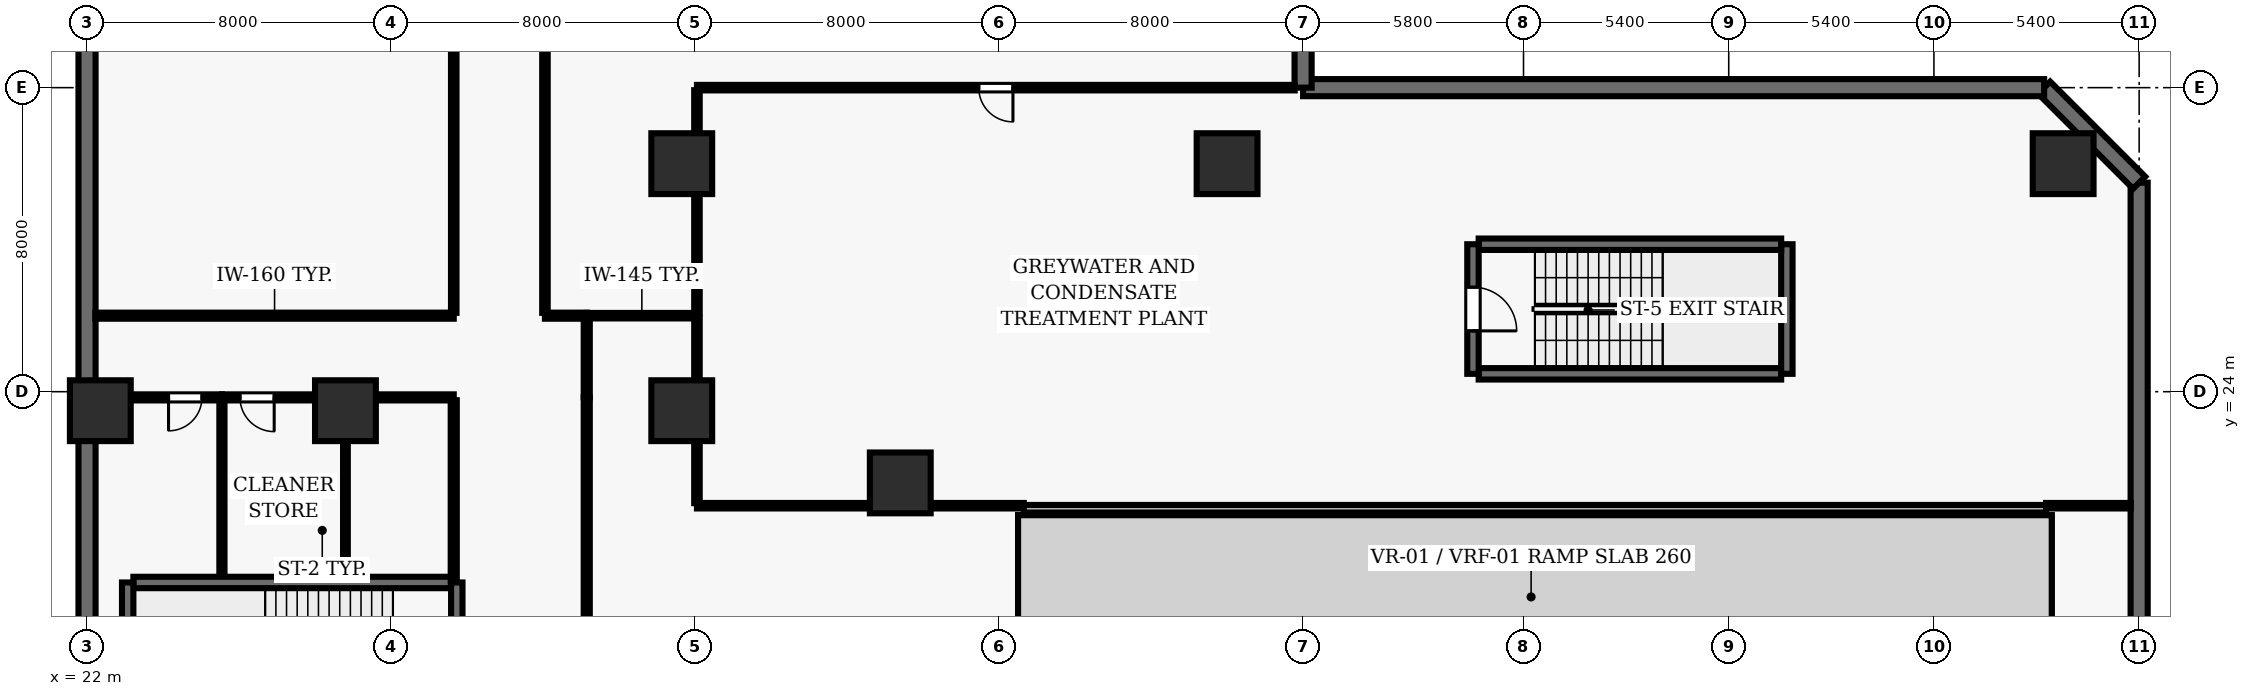
"""IFC4 building model, lengths in metres.
Left out: names, types, materials, properties, quantities, classifications, styles, units other than length and angle.
Written with IfcOpenShell. Run it as: python <this file> out.ifc"""

import sys

from ifc_helpers import new_model, si_unit, direction, frame, frame_2d, origin, origin_2d, place, context, subcontext, project, spatial, rectangle, extrude, element, fill, save


model = new_model("IFC4")
c1 = context("Model", 3, precision=1e-05, world=origin(), true_north=direction((0.0, 1.0)))
c2 = subcontext(c1, "Body", "Model", "MODEL_VIEW")
j1 = project(units=[si_unit("LENGTHUNIT", "METRE"), si_unit("PLANEANGLEUNIT", "RADIAN")], contexts=[c1])
p1 = place(None, origin())
s1 = spatial("IfcSite", under=j1, at=p1, CompositionType="ELEMENT")
p2 = place(p1, origin())
s2 = spatial("IfcBuilding", under=s1, at=p2, CompositionType="ELEMENT")
p3 = place(p2, frame((0.0, 0.0, -9.0)))
s3 = spatial("IfcBuildingStorey", under=s2, at=p3, CompositionType="ELEMENT", Elevation=-9.0)
for number, where, z_axis, x_axis in (
    (1, (22.35, 23.5, 0.0), (0.0, 0.0, 1.0), (1.0, 0.0, 0.0)),
    (2, (28.8, 23.5, 0.0), (0.0, 0.0, 1.0), (1.0, 0.0, 0.0)),
    (3, (37.65, 23.5, 0.0), (0.0, 0.0, 1.0), (1.0, 0.0, 0.0)),
    (4, (37.65, 30.0, 0.0), (0.0, 0.0, 1.0), (1.0, 0.0, 0.0)),
    (5, (43.4, 21.6, 0.0), (0.0, 0.0, 1.0), (1.0, 0.0, 0.0)),
    (6, (52.0, 30.0, 0.0), (0.0, 0.0, 1.0), (1.0, 0.0, 0.0)),
    (7, (74.0, 30.0, 0.0), (0.0, 0.0, 1.0), (1.0, 0.0, 0.0)),
):
    element("IfcColumn", number, at=place(p3, frame(where, z_axis=z_axis, x_axis=x_axis)), inside=s3, PredefinedType="COLUMN", context=c2, shape_type="SweptSolid", body=[
        extrude(rectangle(XDim=1.6, YDim=1.6, at=origin_2d()), origin(), (0.0, 0.0, 1.0), 4.5),
    ])
p4 = place(p3, frame((76.0, 2.5, 0.0), z_axis=(0.0, 0.0, 1.0), x_axis=(0.0, 1.0, 0.0)))
e8 = element("IfcWall", 8, at=p4, inside=s3, PredefinedType="USERDEFINED", context=c2, shape_type="SweptSolid", body=[
    extrude(rectangle(XDim=27.0, YDim=0.45, at=frame_2d((13.5, 0.0))), origin(), (0.0, 0.0, 1.0), 4.22),
])
p5 = place(p3, frame((76.0, 29.5, 0.0), z_axis=(0.0, 0.0, 1.0), x_axis=(-0.707106781187, 0.707106781187, 0.0)))
e9 = element("IfcWall", 9, at=p5, inside=s3, PredefinedType="USERDEFINED", context=c2, shape_type="SweptSolid", body=[
    extrude(rectangle(XDim=3.536, YDim=0.45, at=frame_2d((1.768, 0.0))), origin(), (0.0, 0.0, 1.0), 4.22),
])
for number, where, z_axis, x_axis in (
    (10, (73.5, 32.0, 0.0), (0.0, 0.0, 1.0), (-1.0, 0.0, 0.0)),
    (11, (54.0, 32.0, 0.0), (0.0, 0.0, 1.0), (0.0, 1.0, 0.0)),
):
    element("IfcWall", number, at=place(p3, frame(where, z_axis=z_axis, x_axis=x_axis)), inside=s3, PredefinedType="USERDEFINED", context=c2, shape_type="SweptSolid", body=[
        extrude(rectangle(XDim=19.5, YDim=0.45, at=frame_2d((9.75, 0.0))), origin(), (0.0, 0.0, 1.0), 4.22),
    ])
p6 = place(p3, frame((22.0, 51.5, 0.0), z_axis=(0.0, 0.0, 1.0), x_axis=(0.0, -1.0, 0.0)))
e12 = element("IfcWall", 12, at=p6, inside=s3, PredefinedType="USERDEFINED", context=c2, shape_type="SweptSolid", body=[
    extrude(rectangle(XDim=49.0, YDim=0.45, at=frame_2d((24.5, 0.0))), origin(), (0.0, 0.0, 1.0), 4.22),
])
p7 = place(p3, frame((31.58, 18.98, 0.0), z_axis=(0.0, 0.0, 1.0), x_axis=(-1.0, 0.0, 0.0)))
e13 = element("IfcWall", 13, at=p7, inside=s3, PredefinedType="SHEAR", context=c2, shape_type="SweptSolid", body=[
    extrude(rectangle(XDim=8.36, YDim=0.3, at=frame_2d((4.18, 0.0))), origin(), (0.0, 0.0, 1.0), 4.22),
])
p8 = place(p3, frame((23.07, 18.98, 0.0), z_axis=(0.0, 0.0, 1.0), x_axis=(0.0, -1.0, 0.0)))
e14 = element("IfcWall", 14, at=p8, inside=s3, PredefinedType="SHEAR", context=c2, shape_type="SweptSolid", body=[
    extrude(rectangle(XDim=3.51, YDim=0.3, at=frame_2d((1.755, 0.0))), origin(), (0.0, 0.0, 1.0), 4.22),
])
p9 = place(p3, frame((31.73, 15.47, 0.0), z_axis=(0.0, 0.0, 1.0), x_axis=(0.0, 1.0, 0.0)))
e15 = element("IfcWall", 15, at=p9, inside=s3, PredefinedType="SHEAR", context=c2, shape_type="SweptSolid", body=[
    extrude(rectangle(XDim=3.51, YDim=0.3, at=frame_2d((1.755, 0.0))), origin(), (0.0, 0.0, 1.0), 4.22),
])
p10 = place(p9, frame((1.18, 0.0, 0.0)))
e16 = element("IfcOpeningElement", 16, at=p10, cuts=e15, PredefinedType="OPENING", context=c2, shape_type="SweptSolid", body=[
    extrude(rectangle(XDim=1.15, YDim=2.15, at=frame_2d((0.575, 1.075))), frame((0.0, 0.16, 0.0), z_axis=(0.0, -1.0, 0.0), x_axis=(1.0, 0.0, 0.0)), (0.0, 0.0, 1.0), 0.32),
])
p11 = place(p3, frame((58.62, 24.47, 0.0), z_axis=(0.0, 0.0, 1.0), x_axis=(1.0, 0.0, 0.0)))
e17 = element("IfcWall", 17, at=p11, inside=s3, PredefinedType="SHEAR", context=c2, shape_type="SweptSolid", body=[
    extrude(rectangle(XDim=7.96, YDim=0.3, at=frame_2d((3.98, 0.0))), origin(), (0.0, 0.0, 1.0), 4.22),
])
p12 = place(p3, frame((66.73, 24.47, 0.0), z_axis=(0.0, 0.0, 1.0), x_axis=(0.0, 1.0, 0.0)))
e18 = element("IfcWall", 18, at=p12, inside=s3, PredefinedType="SHEAR", context=c2, shape_type="SweptSolid", body=[
    extrude(rectangle(XDim=3.41, YDim=0.3, at=frame_2d((1.705, 0.0))), origin(), (0.0, 0.0, 1.0), 4.22),
])
p13 = place(p3, frame((66.58, 27.88, 0.0), z_axis=(0.0, 0.0, 1.0), x_axis=(-1.0, 0.0, 0.0)))
e19 = element("IfcWall", 19, at=p13, inside=s3, PredefinedType="SHEAR", context=c2, shape_type="SweptSolid", body=[
    extrude(rectangle(XDim=7.96, YDim=0.3, at=frame_2d((3.98, 0.0))), origin(), (0.0, 0.0, 1.0), 4.22),
])
p14 = place(p3, frame((58.47, 27.88, 0.0), z_axis=(0.0, 0.0, 1.0), x_axis=(0.0, -1.0, 0.0)))
e20 = element("IfcWall", 20, at=p14, inside=s3, PredefinedType="SHEAR", context=c2, shape_type="SweptSolid", body=[
    extrude(rectangle(XDim=3.41, YDim=0.3, at=frame_2d((1.705, 0.0))), origin(), (0.0, 0.0, 1.0), 4.22),
])
p15 = place(p14, frame((1.13, 0.0, 0.0)))
e21 = element("IfcOpeningElement", 21, at=p15, cuts=e20, PredefinedType="OPENING", context=c2, shape_type="SweptSolid", body=[
    extrude(rectangle(XDim=1.15, YDim=2.15, at=frame_2d((0.575, 1.075))), frame((0.0, 0.16, 0.0), z_axis=(0.0, -1.0, 0.0), x_axis=(1.0, 0.0, 0.0)), (0.0, 0.0, 1.0), 0.32),
])
p16 = place(p3, frame((46.65, 20.92, 0.0), z_axis=(0.0, 0.0, 1.0), x_axis=(1.0, 0.0, 0.0)))
e22 = element("IfcWall", 22, at=p16, inside=s3, PredefinedType="SOLIDWALL", context=c2, shape_type="SweptSolid", body=[
    extrude(rectangle(XDim=26.9, YDim=0.2, at=frame_2d((13.45, 0.0))), origin(), (0.0, 0.0, 1.0), 4.22),
])
p17 = place(p3, frame((25.55, 23.85, 0.0), z_axis=(0.0, 0.0, 1.0), x_axis=(-1.0, 0.0, 0.0)))
e23 = element("IfcWall", 23, at=p17, inside=s3, PredefinedType="PARTITIONING", context=c2, shape_type="SweptSolid", body=[
    extrude(rectangle(XDim=3.33, YDim=0.16, at=frame_2d((1.665, 0.0))), origin(), (0.0, 0.0, 1.0), 3.365),
])
p18 = place(p17, frame((0.525, 0.0, 0.0)))
e24 = element("IfcOpeningElement", 24, at=p18, cuts=e23, PredefinedType="OPENING", context=c2, shape_type="SweptSolid", body=[
    extrude(rectangle(XDim=0.88, YDim=2.1, at=frame_2d((0.44, 1.05))), frame((0.0, 0.09, 0.0), z_axis=(0.0, -1.0, 0.0), x_axis=(1.0, 0.0, 0.0)), (0.0, 0.0, 1.0), 0.18),
])
p19 = place(p3, frame((28.8, 23.85, 0.0), z_axis=(0.0, 0.0, 1.0), x_axis=(-1.0, 0.0, 0.0)))
e25 = element("IfcWall", 25, at=p19, inside=s3, PredefinedType="PARTITIONING", context=c2, shape_type="SweptSolid", body=[
    extrude(rectangle(XDim=3.25, YDim=0.16, at=frame_2d((1.625, 0.0))), origin(), (0.0, 0.0, 1.0), 3.365),
])
p20 = place(p19, frame((1.875, 0.0, 0.0)))
e26 = element("IfcOpeningElement", 26, at=p20, cuts=e25, PredefinedType="OPENING", context=c2, shape_type="SweptSolid", body=[
    extrude(rectangle(XDim=0.9, YDim=2.1, at=frame_2d((0.45, 1.05))), frame((0.0, 0.09, 0.0), z_axis=(0.0, -1.0, 0.0), x_axis=(1.0, 0.0, 0.0)), (0.0, 0.0, 1.0), 0.18),
])
p21 = place(p3, frame((28.8, 23.85, 0.0), z_axis=(0.0, 0.0, 1.0), x_axis=(1.0, 0.0, 0.0)))
e27 = element("IfcWall", 27, at=p21, inside=s3, PredefinedType="PARTITIONING", context=c2, shape_type="SweptSolid", body=[
    extrude(rectangle(XDim=2.85, YDim=0.16, at=frame_2d((1.425, 0.0))), origin(), (0.0, 0.0, 1.0), 3.365),
])
p22 = place(p3, frame((31.65, 26.0, 0.0), z_axis=(0.0, 0.0, 1.0), x_axis=(-1.0, 0.0, 0.0)))
e28 = element("IfcWall", 28, at=p22, inside=s3, PredefinedType="PARTITIONING", context=c2, shape_type="SweptSolid", body=[
    extrude(rectangle(XDim=9.43, YDim=0.16, at=frame_2d((4.715, 0.0))), origin(), (0.0, 0.0, 1.0), 4.22),
])
p23 = place(p3, frame((35.15, 26.0, 0.0), z_axis=(0.0, 0.0, 1.0), x_axis=(-1.0, 0.0, 0.0)))
e29 = element("IfcWall", 29, at=p23, inside=s3, PredefinedType="PARTITIONING", context=c2, shape_type="SweptSolid", body=[
    extrude(rectangle(XDim=1.1, YDim=0.16, at=frame_2d((0.55, 0.0))), origin(), (0.0, 0.0, 1.0), 4.22),
])
p24 = place(p3, frame((35.15, 26.0, 0.0), z_axis=(0.0, 0.0, 1.0), x_axis=(1.0, 0.0, 0.0)))
e30 = element("IfcWall", 30, at=p24, inside=s3, PredefinedType="PARTITIONING", context=c2, shape_type="SweptSolid", body=[
    extrude(rectangle(XDim=2.9, YDim=0.145, at=frame_2d((1.45, 0.0))), origin(), (0.0, 0.0, 1.0), 4.22),
])
p25 = place(p3, frame((38.05, 21.0, 0.0), z_axis=(0.0, 0.0, 1.0), x_axis=(1.0, 0.0, 0.0)))
e31 = element("IfcWall", 31, at=p25, inside=s3, PredefinedType="PARTITIONING", context=c2, shape_type="SweptSolid", body=[
    extrude(rectangle(XDim=8.6, YDim=0.145, at=frame_2d((4.3, 0.0))), origin(), (0.0, 0.0, 1.0), 4.22),
])
p26 = place(p3, frame((53.78, 32.0, 0.0), z_axis=(0.0, 0.0, 1.0), x_axis=(-1.0, 0.0, 0.0)))
e32 = element("IfcWall", 32, at=p26, inside=s3, PredefinedType="PARTITIONING", context=c2, shape_type="SweptSolid", body=[
    extrude(rectangle(XDim=15.73, YDim=0.145, at=frame_2d((7.865, 0.0))), origin(), (0.0, 0.0, 1.0), 4.22),
])
p27 = place(p26, frame((7.415, 0.0, 0.0)))
e33 = element("IfcOpeningElement", 33, at=p27, cuts=e32, PredefinedType="OPENING", context=c2, shape_type="SweptSolid", body=[
    extrude(rectangle(XDim=0.9, YDim=2.1, at=frame_2d((0.45, 1.05))), frame((0.0, 0.083, 0.0), z_axis=(0.0, -1.0, 0.0), x_axis=(1.0, 0.0, 0.0)), (0.0, 0.0, 1.0), 0.165),
])
p28 = place(p3, frame((73.55, 21.0, 0.0), z_axis=(0.0, 0.0, 1.0), x_axis=(1.0, 0.0, 0.0)))
e34 = element("IfcWall", 34, at=p28, inside=s3, PredefinedType="PARTITIONING", context=c2, shape_type="SweptSolid", body=[
    extrude(rectangle(XDim=2.23, YDim=0.145, at=frame_2d((1.115, 0.0))), origin(), (0.0, 0.0, 1.0), 4.22),
])
p29 = place(p3, frame((25.55, 19.16, 0.0), z_axis=(0.0, 0.0, 1.0), x_axis=(0.0, 1.0, 0.0)))
e35 = element("IfcWall", 35, at=p29, inside=s3, PredefinedType="PARTITIONING", context=c2, shape_type="SweptSolid", body=[
    extrude(rectangle(XDim=4.615, YDim=0.135, at=frame_2d((2.308, 0.0))), origin(), (0.0, 0.0, 1.0), 4.22),
])
p30 = place(p3, frame((28.8, 19.16, 0.0), z_axis=(0.0, 0.0, 1.0), x_axis=(0.0, 1.0, 0.0)))
e36 = element("IfcWall", 36, at=p30, inside=s3, PredefinedType="PARTITIONING", context=c2, shape_type="SweptSolid", body=[
    extrude(rectangle(XDim=4.615, YDim=0.125, at=frame_2d((2.308, 0.0))), origin(), (0.0, 0.0, 1.0), 4.22),
])
p31 = place(p3, frame((31.65, 23.775, 0.0), z_axis=(0.0, 0.0, 1.0), x_axis=(0.0, -1.0, 0.0)))
e37 = element("IfcWall", 37, at=p31, inside=s3, PredefinedType="PARTITIONING", context=c2, shape_type="SweptSolid", body=[
    extrude(rectangle(XDim=4.765, YDim=0.16, at=frame_2d((2.382, 0.0))), origin(), (0.0, 0.0, 1.0), 4.22),
])
p32 = place(p3, frame((31.65, 53.78, 0.0), z_axis=(0.0, 0.0, 1.0), x_axis=(0.0, -1.0, 0.0)))
e38 = element("IfcWall", 38, at=p32, inside=s3, PredefinedType="PARTITIONING", context=c2, shape_type="SweptSolid", body=[
    extrude(rectangle(XDim=27.705, YDim=0.145, at=frame_2d((13.853, 0.0))), origin(), (0.0, 0.0, 1.0), 4.22),
])
p33 = place(p32, frame((13.403, 0.0, 0.0)))
e39 = element("IfcOpeningElement", 39, at=p33, cuts=e38, PredefinedType="OPENING", context=c2, shape_type="SweptSolid", body=[
    extrude(rectangle(XDim=0.9, YDim=2.1, at=frame_2d((0.45, 1.05))), frame((0.0, 0.083, 0.0), z_axis=(0.0, -1.0, 0.0), x_axis=(1.0, 0.0, 0.0)), (0.0, 0.0, 1.0), 0.165),
])
p34 = place(p3, frame((34.05, 26.075, 0.0), z_axis=(0.0, 0.0, 1.0), x_axis=(0.0, 1.0, 0.0)))
e40 = element("IfcWall", 40, at=p34, inside=s3, PredefinedType="PARTITIONING", context=c2, shape_type="SweptSolid", body=[
    extrude(rectangle(XDim=27.705, YDim=0.145, at=frame_2d((13.853, 0.0))), origin(), (0.0, 0.0, 1.0), 4.22),
])
p35 = place(p34, frame((13.403, 0.0, 0.0)))
e41 = element("IfcOpeningElement", 41, at=p35, cuts=e40, PredefinedType="OPENING", context=c2, shape_type="SweptSolid", body=[
    extrude(rectangle(XDim=0.9, YDim=2.1, at=frame_2d((0.45, 1.05))), frame((0.0, 0.083, 0.0), z_axis=(0.0, -1.0, 0.0), x_axis=(1.0, 0.0, 0.0)), (0.0, 0.0, 1.0), 0.165),
])
p36 = place(p3, frame((35.15, 9.625, 0.0), z_axis=(0.0, 0.0, 1.0), x_axis=(0.0, 1.0, 0.0)))
e42 = element("IfcWall", 42, at=p36, inside=s3, PredefinedType="PARTITIONING", context=c2, shape_type="SweptSolid", body=[
    extrude(rectangle(XDim=14.225, YDim=0.16, at=frame_2d((7.113, 0.0))), origin(), (0.0, 0.0, 1.0), 4.22),
])
p37 = place(p3, frame((35.15, 23.85, 0.0), z_axis=(0.0, 0.0, 1.0), x_axis=(0.0, 1.0, 0.0)))
e43 = element("IfcWall", 43, at=p37, inside=s3, PredefinedType="PARTITIONING", context=c2, shape_type="SweptSolid", body=[
    extrude(rectangle(XDim=2.075, YDim=0.16, at=frame_2d((1.038, 0.0))), origin(), (0.0, 0.0, 1.0), 4.22),
])
p38 = place(p3, frame((38.05, 25.933, 0.0), z_axis=(0.0, 0.0, 1.0), x_axis=(0.0, -1.0, 0.0)))
e44 = element("IfcWall", 44, at=p38, inside=s3, PredefinedType="PARTITIONING", context=c2, shape_type="SweptSolid", body=[
    extrude(rectangle(XDim=4.866, YDim=0.145, at=frame_2d((2.433, 0.0))), origin(), (0.0, 0.0, 1.0), 3.365),
])
p39 = place(p3, frame((38.05, 31.933, 0.0), z_axis=(0.0, 0.0, 1.0), x_axis=(0.0, -1.0, 0.0)))
e45 = element("IfcWall", 45, at=p39, inside=s3, PredefinedType="PARTITIONING", context=c2, shape_type="SweptSolid", body=[
    extrude(rectangle(XDim=5.866, YDim=0.145, at=frame_2d((2.933, 0.0))), origin(), (0.0, 0.0, 1.0), 3.365),
])
p40 = place(p15, origin())
e46 = element("IfcDoor", 46, at=p40, inside=s3, OperationType="SINGLE_SWING_RIGHT", PredefinedType="DOOR", context=c2, shape_type="SweptSolid", body=[
    extrude(rectangle(XDim=1.15, YDim=2.15, at=frame_2d((0.575, 1.075))), frame((0.0, 0.025, 0.0), z_axis=(0.0, -1.0, 0.0), x_axis=(1.0, 0.0, 0.0)), (0.0, 0.0, 1.0), 0.05),
])
fill(e21, e46)
p41 = place(p18, origin())
e47 = element("IfcDoor", 47, at=p41, inside=s3, OperationType="SINGLE_SWING_RIGHT", PredefinedType="DOOR", context=c2, shape_type="SweptSolid", body=[
    extrude(rectangle(XDim=0.88, YDim=2.1, at=frame_2d((0.44, 1.05))), frame((0.0, 0.025, 0.0), z_axis=(0.0, -1.0, 0.0), x_axis=(1.0, 0.0, 0.0)), (0.0, 0.0, 1.0), 0.05),
])
fill(e24, e47)
p42 = place(p20, origin())
e48 = element("IfcDoor", 48, at=p42, inside=s3, OperationType="SINGLE_SWING_LEFT", PredefinedType="DOOR", context=c2, shape_type="SweptSolid", body=[
    extrude(rectangle(XDim=0.9, YDim=2.1, at=frame_2d((0.45, 1.05))), frame((0.0, 0.025, 0.0), z_axis=(0.0, -1.0, 0.0), x_axis=(1.0, 0.0, 0.0)), (0.0, 0.0, 1.0), 0.05),
])
fill(e26, e48)
p43 = place(p27, origin())
e49 = element("IfcDoor", 49, at=p43, inside=s3, OperationType="SINGLE_SWING_LEFT", PredefinedType="DOOR", context=c2, shape_type="SweptSolid", body=[
    extrude(rectangle(XDim=0.9, YDim=2.1, at=frame_2d((0.45, 1.05))), frame((0.0, 0.025, 0.0), z_axis=(0.0, -1.0, 0.0), x_axis=(1.0, 0.0, 0.0)), (0.0, 0.0, 1.0), 0.05),
])
fill(e33, e49)
save(model, sys.argv[1])
